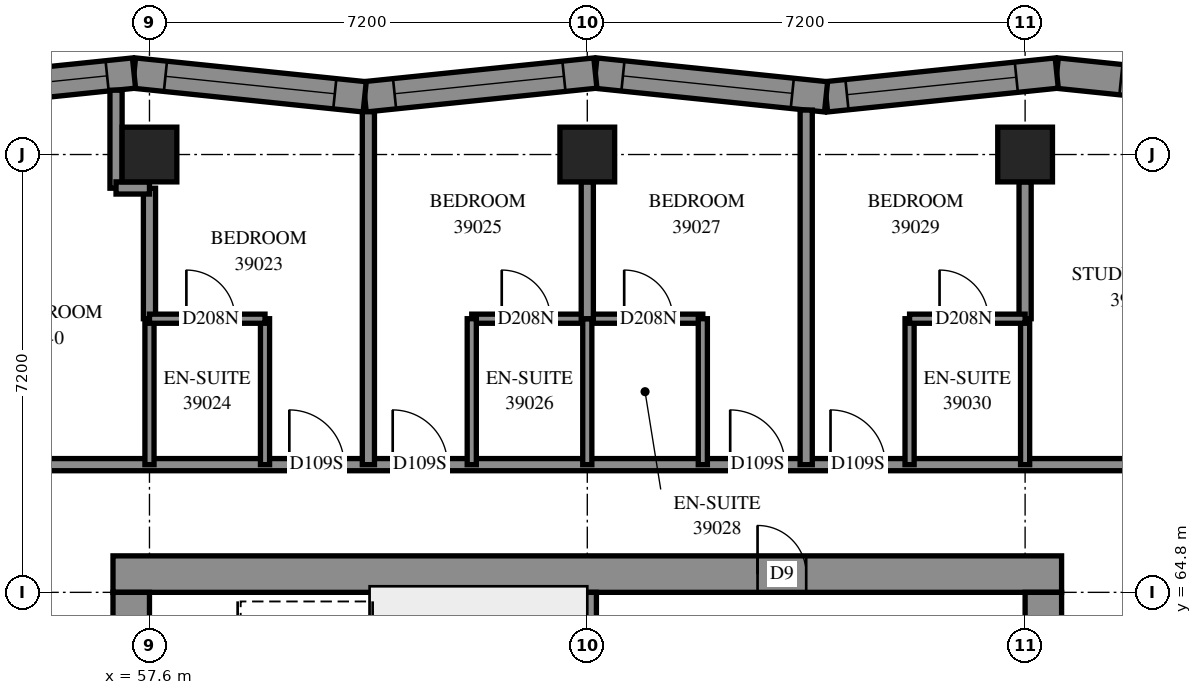
"""IFC4 building model, lengths in metres.
Left out: names, types, materials, properties, quantities, classifications, styles, units other than length and angle.
Written with IfcOpenShell. Run it as: python <this file> out.ifc"""

import sys

from ifc_helpers import new_model, si_unit, direction, frame, frame_2d, origin, origin_2d, place, context, subcontext, project, spatial, polyline, rectangle, outline, extrude, element, fill, save


model = new_model("IFC4")
c1 = context("Model", 3, precision=1e-05, world=origin(), true_north=direction((0.0, 1.0)))
c2 = subcontext(c1, "Body", "Model", "MODEL_VIEW")
j1 = project(units=[si_unit("LENGTHUNIT", "METRE"), si_unit("PLANEANGLEUNIT", "RADIAN")], contexts=[c1])
p1 = place(None, origin())
s1 = spatial("IfcSite", under=j1, at=p1, CompositionType="ELEMENT")
p2 = place(p1, origin())
s2 = spatial("IfcBuilding", under=s1, at=p2, CompositionType="ELEMENT")
p3 = place(p2, frame((0.0, 0.0, 145.6)))
s3 = spatial("IfcBuildingStorey", under=s2, at=p3, CompositionType="ELEMENT", Elevation=145.6)
for number, where, z_axis, x_axis in (
    (1, (57.6, 72.0, 0.0), (0.0, 0.0, 1.0), (1.0, 0.0, 0.0)),
    (2, (64.8, 72.0, 0.0), (0.0, 0.0, 1.0), (1.0, 0.0, 0.0)),
    (3, (72.0, 72.0, 0.0), (0.0, 0.0, 1.0), (1.0, 0.0, 0.0)),
):
    element("IfcColumn", number, at=place(p3, frame(where, z_axis=z_axis, x_axis=x_axis)), inside=s3, PredefinedType="COLUMN", context=c2, shape_type="SweptSolid", body=[
        extrude(rectangle(XDim=0.9, YDim=0.9, at=origin_2d()), origin(), (0.0, 0.0, 1.0), 3.1),
    ])
p4 = place(p3, frame((57.0, 65.1, -0.3), z_axis=(0.0, 0.0, 1.0), x_axis=(1.0, 0.0, 0.0)))
e4 = element("IfcWall", 4, at=p4, inside=s3, PredefinedType="SHEAR", context=c2, shape_type="SweptSolid", body=[
    extrude(rectangle(XDim=15.6, YDim=0.6, at=frame_2d((7.8, 0.0))), origin(), (0.0, 0.0, 1.0), 2.7),
])
p5 = place(p4, frame((10.6, 0.0, 0.3)))
e5 = element("IfcOpeningElement", 5, at=p5, cuts=e4, PredefinedType="OPENING", context=c2, shape_type="SweptSolid", body=[
    extrude(rectangle(XDim=0.8, YDim=2.1, at=frame_2d((0.4, 1.05))), frame((0.0, 0.31, 0.0), z_axis=(0.0, -1.0, 0.0), x_axis=(1.0, 0.0, 0.0)), (0.0, 0.0, 1.0), 0.62),
])
p6 = place(p3, frame((57.3, 50.4, -0.3), z_axis=(0.0, 0.0, 1.0), x_axis=(0.0, 1.0, 0.0)))
e6 = element("IfcWall", 6, at=p6, inside=s3, PredefinedType="SHEAR", context=c2, shape_type="SweptSolid", body=[
    extrude(rectangle(XDim=14.4, YDim=0.6, at=frame_2d((7.2, 0.0))), origin(), (0.0, 0.0, 1.0), 2.7),
])
p7 = place(p6, frame((4.55, 0.0, 0.3)))
e7 = element("IfcOpeningElement", 7, at=p7, cuts=e6, PredefinedType="OPENING", context=c2, shape_type="SweptSolid", body=[
    extrude(rectangle(XDim=1.1, YDim=2.1, at=frame_2d((0.55, 1.05))), frame((0.0, 0.31, 0.0), z_axis=(0.0, -1.0, 0.0), x_axis=(1.0, 0.0, 0.0)), (0.0, 0.0, 1.0), 0.62),
])
p8 = place(p6, frame((11.35, 0.0, 0.3)))
e8 = element("IfcOpeningElement", 8, at=p8, cuts=e6, PredefinedType="OPENING", context=c2, shape_type="SweptSolid", body=[
    extrude(rectangle(XDim=1.1, YDim=2.1, at=frame_2d((0.55, 1.05))), frame((0.0, 0.31, 0.0), z_axis=(0.0, -1.0, 0.0), x_axis=(1.0, 0.0, 0.0)), (0.0, 0.0, 1.0), 0.62),
])
p9 = place(p3, frame((72.3, 50.4, -0.3), z_axis=(0.0, 0.0, 1.0), x_axis=(0.0, 1.0, 0.0)))
e9 = element("IfcWall", 9, at=p9, inside=s3, PredefinedType="SHEAR", context=c2, shape_type="SweptSolid", body=[
    extrude(rectangle(XDim=14.4, YDim=0.6, at=frame_2d((7.2, 0.0))), origin(), (0.0, 0.0, 1.0), 2.7),
])
p10 = place(p9, frame((4.55, 0.0, 0.3)))
e10 = element("IfcOpeningElement", 10, at=p10, cuts=e9, PredefinedType="OPENING", context=c2, shape_type="SweptSolid", body=[
    extrude(rectangle(XDim=1.1, YDim=2.1, at=frame_2d((0.55, 1.05))), frame((0.0, 0.31, 0.0), z_axis=(0.0, -1.0, 0.0), x_axis=(1.0, 0.0, 0.0)), (0.0, 0.0, 1.0), 0.62),
])
p11 = place(p9, frame((11.35, 0.0, 0.3)))
e11 = element("IfcOpeningElement", 11, at=p11, cuts=e9, PredefinedType="OPENING", context=c2, shape_type="SweptSolid", body=[
    extrude(rectangle(XDim=1.1, YDim=2.1, at=frame_2d((0.55, 1.05))), frame((0.0, 0.31, 0.0), z_axis=(0.0, -1.0, 0.0), x_axis=(1.0, 0.0, 0.0)), (0.0, 0.0, 1.0), 0.62),
])
p12 = place(p3, frame((64.8, 60.6, 0.0), z_axis=(0.0, 0.0, 1.0), x_axis=(0.0, 1.0, 0.0)))
e12 = element("IfcWall", 12, at=p12, inside=s3, PredefinedType="SOLIDWALL", context=c2, shape_type="SweptSolid", body=[
    extrude(rectangle(XDim=4.2, YDim=0.3, at=frame_2d((2.1, 0.0))), origin(), (0.0, 0.0, 1.0), 3.1),
])
p13 = place(p3, frame((76.333, 72.947, 0.0), z_axis=(0.0, 0.0, 1.0), x_axis=(-0.994730395, 0.10252532, 0.0)))
e13 = element("IfcWall", 13, at=p13, inside=s3, PredefinedType="SOLIDWALL", context=c2, shape_type="SweptSolid", body=[
    extrude(outline(polyline([(0.045, -0.25), (3.859, -0.25), (3.808, 0.25), (-0.045, 0.25), (0.045, -0.25)])), origin(), (0.0, 0.0, 1.0), 3.1),
])
p14 = place(p13, frame((1.572, 0.0, 0.45)))
e14 = element("IfcOpeningElement", 14, at=p14, cuts=e13, PredefinedType="OPENING", context=c2, shape_type="SweptSolid", body=[
    extrude(rectangle(XDim=1.2, YDim=2.5, at=frame_2d((0.6, 1.25))), frame((0.0, 0.26, 0.0), z_axis=(0.0, -1.0, 0.0), x_axis=(1.0, 0.0, 0.0)), (0.0, 0.0, 1.0), 0.52),
])
p15 = place(p3, frame((72.52, 73.34, 0.0), z_axis=(0.0, 0.0, 1.0), x_axis=(-0.9947306832, -0.1025225234, 0.0)))
e15 = element("IfcWall", 15, at=p15, inside=s3, PredefinedType="SOLIDWALL", context=c2, shape_type="SweptSolid", body=[
    extrude(outline(polyline([(-0.026, -0.25), (3.788, -0.25), (3.84, 0.25), (0.026, 0.25), (-0.026, -0.25)])), origin(), (0.0, 0.0, 1.0), 3.1),
])
p16 = place(p15, frame((0.668, 0.0, 0.45)))
e16 = element("IfcOpeningElement", 16, at=p16, cuts=e15, PredefinedType="OPENING", context=c2, shape_type="SweptSolid", body=[
    extrude(rectangle(XDim=2.8, YDim=2.5, at=frame_2d((1.4, 1.25))), frame((0.0, 0.26, 0.0), z_axis=(0.0, -1.0, 0.0), x_axis=(1.0, 0.0, 0.0)), (0.0, 0.0, 1.0), 0.52),
])
p17 = place(p3, frame((68.727, 72.949, 0.0), z_axis=(0.0, 0.0, 1.0), x_axis=(-0.9947306832, 0.1025225234, 0.0)))
e17 = element("IfcWall", 17, at=p17, inside=s3, PredefinedType="SOLIDWALL", context=c2, shape_type="SweptSolid", body=[
    extrude(outline(polyline([(0.026, -0.25), (3.84, -0.25), (3.788, 0.25), (-0.026, 0.25), (0.026, -0.25)])), origin(), (0.0, 0.0, 1.0), 3.1),
])
p18 = place(p17, frame((0.558, 0.0, 0.45)))
e18 = element("IfcOpeningElement", 18, at=p18, cuts=e17, PredefinedType="OPENING", context=c2, shape_type="SweptSolid", body=[
    extrude(rectangle(XDim=2.8, YDim=2.5, at=frame_2d((1.4, 1.25))), frame((0.0, 0.26, 0.0), z_axis=(0.0, -1.0, 0.0), x_axis=(1.0, 0.0, 0.0)), (0.0, 0.0, 1.0), 0.52),
])
p19 = place(p3, frame((64.933, 73.34, 0.0), z_axis=(0.0, 0.0, 1.0), x_axis=(-0.9947304076, -0.1025251975, 0.0)))
e19 = element("IfcWall", 19, at=p19, inside=s3, PredefinedType="SOLIDWALL", context=c2, shape_type="SweptSolid", body=[
    extrude(outline(polyline([(-0.026, -0.25), (3.788, -0.25), (3.84, 0.25), (0.026, 0.25), (-0.026, -0.25)])), origin(), (0.0, 0.0, 1.0), 3.1),
])
p20 = place(p19, frame((0.52, 0.0, 0.45)))
e20 = element("IfcOpeningElement", 20, at=p20, cuts=e19, PredefinedType="OPENING", context=c2, shape_type="SweptSolid", body=[
    extrude(rectangle(XDim=2.8, YDim=2.5, at=frame_2d((1.4, 1.25))), frame((0.0, 0.26, 0.0), z_axis=(0.0, -1.0, 0.0), x_axis=(1.0, 0.0, 0.0)), (0.0, 0.0, 1.0), 0.52),
])
p21 = place(p3, frame((61.139, 72.949, 0.0), z_axis=(0.0, 0.0, 1.0), x_axis=(-0.9947306832, 0.1025225234, 0.0)))
e21 = element("IfcWall", 21, at=p21, inside=s3, PredefinedType="SOLIDWALL", context=c2, shape_type="SweptSolid", body=[
    extrude(outline(polyline([(0.026, -0.25), (3.84, -0.25), (3.788, 0.25), (-0.026, 0.25), (0.026, -0.25)])), origin(), (0.0, 0.0, 1.0), 3.1),
])
p22 = place(p21, frame((0.494, 0.0, 0.45)))
e22 = element("IfcOpeningElement", 22, at=p22, cuts=e21, PredefinedType="OPENING", context=c2, shape_type="SweptSolid", body=[
    extrude(rectangle(XDim=2.8, YDim=2.5, at=frame_2d((1.4, 1.25))), frame((0.0, 0.26, 0.0), z_axis=(0.0, -1.0, 0.0), x_axis=(1.0, 0.0, 0.0)), (0.0, 0.0, 1.0), 0.52),
])
p23 = place(p3, frame((57.346, 73.34, 0.0), z_axis=(0.0, 0.0, 1.0), x_axis=(-0.9947304076, -0.1025251975, 0.0)))
e23 = element("IfcWall", 23, at=p23, inside=s3, PredefinedType="SOLIDWALL", context=c2, shape_type="SweptSolid", body=[
    extrude(outline(polyline([(-0.026, -0.25), (3.788, -0.25), (3.84, 0.25), (0.026, 0.25), (-0.026, -0.25)])), origin(), (0.0, 0.0, 1.0), 3.1),
])
p24 = place(p23, frame((0.445, 0.0, 0.45)))
e24 = element("IfcOpeningElement", 24, at=p24, cuts=e23, PredefinedType="OPENING", context=c2, shape_type="SweptSolid", body=[
    extrude(rectangle(XDim=2.8, YDim=2.5, at=frame_2d((1.4, 1.25))), frame((0.0, 0.26, 0.0), z_axis=(0.0, -1.0, 0.0), x_axis=(1.0, 0.0, 0.0)), (0.0, 0.0, 1.0), 0.52),
])
p25 = place(p3, frame((55.5, 66.9, 0.0), z_axis=(0.0, 0.0, 1.0), x_axis=(1.0, 0.0, 0.0)))
e25 = element("IfcWall", 25, at=p25, inside=s3, PredefinedType="PARTITIONING", context=c2, shape_type="SweptSolid", body=[
    extrude(rectangle(XDim=18.6, YDim=0.2, at=frame_2d((9.3, 0.0))), origin(), (0.0, 0.0, 1.0), 3.1),
])
p26 = place(p25, frame((4.4, 0.0, 0.0)))
e26 = element("IfcOpeningElement", 26, at=p26, cuts=e25, PredefinedType="OPENING", context=c2, shape_type="SweptSolid", body=[
    extrude(rectangle(XDim=0.9, YDim=2.1, at=frame_2d((0.45, 1.05))), frame((0.0, 0.11, 0.0), z_axis=(0.0, -1.0, 0.0), x_axis=(1.0, 0.0, 0.0)), (0.0, 0.0, 1.0), 0.22),
])
p27 = place(p25, frame((6.1, 0.0, 0.0)))
e27 = element("IfcOpeningElement", 27, at=p27, cuts=e25, PredefinedType="OPENING", context=c2, shape_type="SweptSolid", body=[
    extrude(rectangle(XDim=0.9, YDim=2.1, at=frame_2d((0.45, 1.05))), frame((0.0, 0.11, 0.0), z_axis=(0.0, -1.0, 0.0), x_axis=(1.0, 0.0, 0.0)), (0.0, 0.0, 1.0), 0.22),
])
p28 = place(p25, frame((11.65, 0.0, 0.0)))
e28 = element("IfcOpeningElement", 28, at=p28, cuts=e25, PredefinedType="OPENING", context=c2, shape_type="SweptSolid", body=[
    extrude(rectangle(XDim=0.9, YDim=2.1, at=frame_2d((0.45, 1.05))), frame((0.0, 0.11, 0.0), z_axis=(0.0, -1.0, 0.0), x_axis=(1.0, 0.0, 0.0)), (0.0, 0.0, 1.0), 0.22),
])
p29 = place(p25, frame((13.3, 0.0, 0.0)))
e29 = element("IfcOpeningElement", 29, at=p29, cuts=e25, PredefinedType="OPENING", context=c2, shape_type="SweptSolid", body=[
    extrude(rectangle(XDim=0.9, YDim=2.1, at=frame_2d((0.45, 1.05))), frame((0.0, 0.11, 0.0), z_axis=(0.0, -1.0, 0.0), x_axis=(1.0, 0.0, 0.0)), (0.0, 0.0, 1.0), 0.22),
])
p30 = place(p3, frame((68.4, 66.9, 0.0), z_axis=(0.0, 0.0, 1.0), x_axis=(0.0, 1.0, 0.0)))
e30 = element("IfcWall", 30, at=p30, inside=s3, PredefinedType="PARTITIONING", context=c2, shape_type="SweptSolid", body=[
    extrude(rectangle(XDim=5.831, YDim=0.2, at=frame_2d((2.916, 0.0))), origin(), (0.0, 0.0, 1.0), 3.1),
])
p31 = place(p3, frame((61.2, 66.9, 0.0), z_axis=(0.0, 0.0, 1.0), x_axis=(0.0, 1.0, 0.0)))
e31 = element("IfcWall", 31, at=p31, inside=s3, PredefinedType="PARTITIONING", context=c2, shape_type="SweptSolid", body=[
    extrude(rectangle(XDim=5.804, YDim=0.2, at=frame_2d((2.902, 0.0))), origin(), (0.0, 0.0, 1.0), 3.1),
])
p32 = place(p3, frame((62.9, 69.3, 0.0), z_axis=(0.0, 0.0, 1.0), x_axis=(1.0, 0.0, 0.0)))
e32 = element("IfcWall", 32, at=p32, inside=s3, PredefinedType="PARTITIONING", context=c2, shape_type="SweptSolid", body=[
    extrude(rectangle(XDim=3.8, YDim=0.15, at=frame_2d((1.9, 0.0))), origin(), (0.0, 0.0, 1.0), 3.1),
])
p33 = place(p32, frame((0.493, 0.0, 0.0)))
e33 = element("IfcOpeningElement", 33, at=p33, cuts=e32, PredefinedType="OPENING", context=c2, shape_type="SweptSolid", body=[
    extrude(rectangle(XDim=0.8, YDim=2.1, at=frame_2d((0.4, 1.05))), frame((0.0, 0.085, 0.0), z_axis=(0.0, -1.0, 0.0), x_axis=(1.0, 0.0, 0.0)), (0.0, 0.0, 1.0), 0.17),
])
p34 = place(p32, frame((2.507, 0.0, 0.0)))
e34 = element("IfcOpeningElement", 34, at=p34, cuts=e32, PredefinedType="OPENING", context=c2, shape_type="SweptSolid", body=[
    extrude(rectangle(XDim=0.8, YDim=2.1, at=frame_2d((0.4, 1.05))), frame((0.0, 0.085, 0.0), z_axis=(0.0, -1.0, 0.0), x_axis=(1.0, 0.0, 0.0)), (0.0, 0.0, 1.0), 0.17),
])
for number, where, z_axis, x_axis in (
    (35, (59.5, 66.9, 0.0), (0.0, 0.0, 1.0), (0.0, 1.0, 0.0)),
    (36, (57.6, 66.9, 0.0), (0.0, 0.0, 1.0), (0.0, 1.0, 0.0)),
    (37, (62.9, 66.9, 0.0), (0.0, 0.0, 1.0), (0.0, 1.0, 0.0)),
    (38, (64.8, 66.9, 0.0), (0.0, 0.0, 1.0), (0.0, 1.0, 0.0)),
    (39, (66.7, 66.9, 0.0), (0.0, 0.0, 1.0), (0.0, 1.0, 0.0)),
    (40, (70.1, 66.9, 0.0), (0.0, 0.0, 1.0), (0.0, 1.0, 0.0)),
    (41, (72.0, 66.9, 0.0), (0.0, 0.0, 1.0), (0.0, 1.0, 0.0)),
):
    element("IfcWall", number, at=place(p3, frame(where, z_axis=z_axis, x_axis=x_axis)), inside=s3, PredefinedType="PARTITIONING", context=c2, shape_type="SweptSolid", body=[
        extrude(rectangle(XDim=2.4, YDim=0.15, at=frame_2d((1.2, 0.0))), origin(), (0.0, 0.0, 1.0), 3.1),
    ])
for number, where, z_axis, x_axis in (
    (42, (64.8, 69.3, 0.0), (0.0, 0.0, 1.0), (0.0, 1.0, 0.0)),
    (43, (72.0, 69.3, 0.0), (0.0, 0.0, 1.0), (0.0, 1.0, 0.0)),
):
    element("IfcWall", number, at=place(p3, frame(where, z_axis=z_axis, x_axis=x_axis)), inside=s3, PredefinedType="PARTITIONING", context=c2, shape_type="SweptSolid", body=[
        extrude(rectangle(XDim=2.25, YDim=0.2, at=frame_2d((1.125, 0.0))), origin(), (0.0, 0.0, 1.0), 3.1),
    ])
p35 = place(p3, frame((57.6, 69.3, 0.0), z_axis=(0.0, 0.0, 1.0), x_axis=(0.0, 1.0, 0.0)))
e44 = element("IfcWall", 44, at=p35, inside=s3, PredefinedType="PARTITIONING", context=c2, shape_type="SweptSolid", body=[
    extrude(rectangle(XDim=2.146, YDim=0.2, at=frame_2d((1.073, 0.0))), origin(), (0.0, 0.0, 1.0), 3.1),
])
p36 = place(p3, frame((70.1, 69.3, 0.0), z_axis=(0.0, 0.0, 1.0), x_axis=(1.0, 0.0, 0.0)))
e45 = element("IfcWall", 45, at=p36, inside=s3, PredefinedType="PARTITIONING", context=c2, shape_type="SweptSolid", body=[
    extrude(rectangle(XDim=1.9, YDim=0.15, at=frame_2d((0.95, 0.0))), origin(), (0.0, 0.0, 1.0), 3.1),
])
p37 = place(p36, frame((0.493, 0.0, 0.0)))
e46 = element("IfcOpeningElement", 46, at=p37, cuts=e45, PredefinedType="OPENING", context=c2, shape_type="SweptSolid", body=[
    extrude(rectangle(XDim=0.8, YDim=2.1, at=frame_2d((0.4, 1.05))), frame((0.0, 0.085, 0.0), z_axis=(0.0, -1.0, 0.0), x_axis=(1.0, 0.0, 0.0)), (0.0, 0.0, 1.0), 0.17),
])
p38 = place(p3, frame((57.6, 69.3, 0.0), z_axis=(0.0, 0.0, 1.0), x_axis=(1.0, 0.0, 0.0)))
e47 = element("IfcWall", 47, at=p38, inside=s3, PredefinedType="PARTITIONING", context=c2, shape_type="SweptSolid", body=[
    extrude(rectangle(XDim=1.9, YDim=0.15, at=frame_2d((0.95, 0.0))), origin(), (0.0, 0.0, 1.0), 3.1),
])
p39 = place(p38, frame((0.607, 0.0, 0.0)))
e48 = element("IfcOpeningElement", 48, at=p39, cuts=e47, PredefinedType="OPENING", context=c2, shape_type="SweptSolid", body=[
    extrude(rectangle(XDim=0.8, YDim=2.1, at=frame_2d((0.4, 1.05))), frame((0.0, 0.085, 0.0), z_axis=(0.0, -1.0, 0.0), x_axis=(1.0, 0.0, 0.0)), (0.0, 0.0, 1.0), 0.17),
])
p40 = place(p3, frame((57.05, 71.446, 0.0), z_axis=(0.0, 0.0, 1.0), x_axis=(0.0, 1.0, 0.0)))
e49 = element("IfcWall", 49, at=p40, inside=s3, PredefinedType="PARTITIONING", context=c2, shape_type="SweptSolid", body=[
    extrude(rectangle(XDim=1.612, YDim=0.2, at=frame_2d((0.806, 0.0))), origin(), (0.0, 0.0, 1.0), 3.1),
])
p41 = place(p3, frame((57.05, 71.45, 0.0), z_axis=(0.0, 0.0, 1.0), x_axis=(1.0, 0.0, 0.0)))
e50 = element("IfcWall", 50, at=p41, inside=s3, PredefinedType="PARTITIONING", context=c2, shape_type="SweptSolid", body=[
    extrude(rectangle(XDim=0.55, YDim=0.2, at=frame_2d((0.275, 0.0))), origin(), (0.0, 0.0, 1.0), 3.1),
])
p42 = place(p14, origin())
e51 = element("IfcWindow", 51, at=p42, inside=s3, PartitioningType="SINGLE_PANEL", PredefinedType="WINDOW", context=c2, shape_type="SweptSolid", body=[
    extrude(rectangle(XDim=1.2, YDim=2.5, at=frame_2d((0.6, 1.25))), frame((0.0, 0.18, 0.0), z_axis=(0.0, -1.0, 0.0), x_axis=(1.0, 0.0, 0.0)), (0.0, 0.0, 1.0), 0.06),
])
fill(e14, e51)
p43 = place(p16, origin())
e52 = element("IfcWindow", 52, at=p43, inside=s3, PartitioningType="SINGLE_PANEL", PredefinedType="WINDOW", context=c2, shape_type="SweptSolid", body=[
    extrude(rectangle(XDim=2.8, YDim=2.5, at=frame_2d((1.4, 1.25))), frame((0.0, 0.18, 0.0), z_axis=(0.0, -1.0, 0.0), x_axis=(1.0, 0.0, 0.0)), (0.0, 0.0, 1.0), 0.06),
])
fill(e16, e52)
p44 = place(p18, origin())
e53 = element("IfcWindow", 53, at=p44, inside=s3, PartitioningType="SINGLE_PANEL", PredefinedType="WINDOW", context=c2, shape_type="SweptSolid", body=[
    extrude(rectangle(XDim=2.8, YDim=2.5, at=frame_2d((1.4, 1.25))), frame((0.0, 0.18, 0.0), z_axis=(0.0, -1.0, 0.0), x_axis=(1.0, 0.0, 0.0)), (0.0, 0.0, 1.0), 0.06),
])
fill(e18, e53)
p45 = place(p20, origin())
e54 = element("IfcWindow", 54, at=p45, inside=s3, PartitioningType="SINGLE_PANEL", PredefinedType="WINDOW", context=c2, shape_type="SweptSolid", body=[
    extrude(rectangle(XDim=2.8, YDim=2.5, at=frame_2d((1.4, 1.25))), frame((0.0, 0.18, 0.0), z_axis=(0.0, -1.0, 0.0), x_axis=(1.0, 0.0, 0.0)), (0.0, 0.0, 1.0), 0.06),
])
fill(e20, e54)
p46 = place(p22, origin())
e55 = element("IfcWindow", 55, at=p46, inside=s3, PartitioningType="SINGLE_PANEL", PredefinedType="WINDOW", context=c2, shape_type="SweptSolid", body=[
    extrude(rectangle(XDim=2.8, YDim=2.5, at=frame_2d((1.4, 1.25))), frame((0.0, 0.18, 0.0), z_axis=(0.0, -1.0, 0.0), x_axis=(1.0, 0.0, 0.0)), (0.0, 0.0, 1.0), 0.06),
])
fill(e22, e55)
p47 = place(p24, origin())
e56 = element("IfcWindow", 56, at=p47, inside=s3, PartitioningType="SINGLE_PANEL", PredefinedType="WINDOW", context=c2, shape_type="SweptSolid", body=[
    extrude(rectangle(XDim=2.8, YDim=2.5, at=frame_2d((1.4, 1.25))), frame((0.0, 0.18, 0.0), z_axis=(0.0, -1.0, 0.0), x_axis=(1.0, 0.0, 0.0)), (0.0, 0.0, 1.0), 0.06),
])
fill(e24, e56)
p48 = place(p5, origin())
e57 = element("IfcDoor", 57, at=p48, inside=s3, OperationType="SINGLE_SWING_RIGHT", PredefinedType="DOOR", context=c2, shape_type="SweptSolid", body=[
    extrude(rectangle(XDim=0.8, YDim=2.1, at=frame_2d((0.4, 1.05))), frame((0.0, 0.025, 0.0), z_axis=(0.0, -1.0, 0.0), x_axis=(1.0, 0.0, 0.0)), (0.0, 0.0, 1.0), 0.05),
])
fill(e5, e57)
p49 = place(p26, origin())
e58 = element("IfcDoor", 58, at=p49, inside=s3, OperationType="SINGLE_SWING_RIGHT", PredefinedType="DOOR", context=c2, shape_type="SweptSolid", body=[
    extrude(rectangle(XDim=0.9, YDim=2.1, at=frame_2d((0.45, 1.05))), frame((0.0, 0.025, 0.0), z_axis=(0.0, -1.0, 0.0), x_axis=(1.0, 0.0, 0.0)), (0.0, 0.0, 1.0), 0.05),
])
fill(e26, e58)
p50 = place(p39, origin())
e59 = element("IfcDoor", 59, at=p50, inside=s3, OperationType="SINGLE_SWING_RIGHT", PredefinedType="DOOR", context=c2, shape_type="SweptSolid", body=[
    extrude(rectangle(XDim=0.8, YDim=2.1, at=frame_2d((0.4, 1.05))), frame((0.0, 0.025, 0.0), z_axis=(0.0, -1.0, 0.0), x_axis=(1.0, 0.0, 0.0)), (0.0, 0.0, 1.0), 0.05),
])
fill(e48, e59)
p51 = place(p27, origin())
e60 = element("IfcDoor", 60, at=p51, inside=s3, OperationType="SINGLE_SWING_LEFT", PredefinedType="DOOR", context=c2, shape_type="SweptSolid", body=[
    extrude(rectangle(XDim=0.9, YDim=2.1, at=frame_2d((0.45, 1.05))), frame((0.0, 0.025, 0.0), z_axis=(0.0, -1.0, 0.0), x_axis=(1.0, 0.0, 0.0)), (0.0, 0.0, 1.0), 0.05),
])
fill(e27, e60)
p52 = place(p33, origin())
e61 = element("IfcDoor", 61, at=p52, inside=s3, OperationType="SINGLE_SWING_RIGHT", PredefinedType="DOOR", context=c2, shape_type="SweptSolid", body=[
    extrude(rectangle(XDim=0.8, YDim=2.1, at=frame_2d((0.4, 1.05))), frame((0.0, 0.025, 0.0), z_axis=(0.0, -1.0, 0.0), x_axis=(1.0, 0.0, 0.0)), (0.0, 0.0, 1.0), 0.05),
])
fill(e33, e61)
p53 = place(p28, origin())
e62 = element("IfcDoor", 62, at=p53, inside=s3, OperationType="SINGLE_SWING_RIGHT", PredefinedType="DOOR", context=c2, shape_type="SweptSolid", body=[
    extrude(rectangle(XDim=0.9, YDim=2.1, at=frame_2d((0.45, 1.05))), frame((0.0, 0.025, 0.0), z_axis=(0.0, -1.0, 0.0), x_axis=(1.0, 0.0, 0.0)), (0.0, 0.0, 1.0), 0.05),
])
fill(e28, e62)
p54 = place(p34, origin())
e63 = element("IfcDoor", 63, at=p54, inside=s3, OperationType="SINGLE_SWING_RIGHT", PredefinedType="DOOR", context=c2, shape_type="SweptSolid", body=[
    extrude(rectangle(XDim=0.8, YDim=2.1, at=frame_2d((0.4, 1.05))), frame((0.0, 0.025, 0.0), z_axis=(0.0, -1.0, 0.0), x_axis=(1.0, 0.0, 0.0)), (0.0, 0.0, 1.0), 0.05),
])
fill(e34, e63)
p55 = place(p29, origin())
e64 = element("IfcDoor", 64, at=p55, inside=s3, OperationType="SINGLE_SWING_LEFT", PredefinedType="DOOR", context=c2, shape_type="SweptSolid", body=[
    extrude(rectangle(XDim=0.9, YDim=2.1, at=frame_2d((0.45, 1.05))), frame((0.0, 0.025, 0.0), z_axis=(0.0, -1.0, 0.0), x_axis=(1.0, 0.0, 0.0)), (0.0, 0.0, 1.0), 0.05),
])
fill(e29, e64)
p56 = place(p37, origin())
e65 = element("IfcDoor", 65, at=p56, inside=s3, OperationType="SINGLE_SWING_RIGHT", PredefinedType="DOOR", context=c2, shape_type="SweptSolid", body=[
    extrude(rectangle(XDim=0.8, YDim=2.1, at=frame_2d((0.4, 1.05))), frame((0.0, 0.025, 0.0), z_axis=(0.0, -1.0, 0.0), x_axis=(1.0, 0.0, 0.0)), (0.0, 0.0, 1.0), 0.05),
])
fill(e46, e65)
save(model, sys.argv[1])
